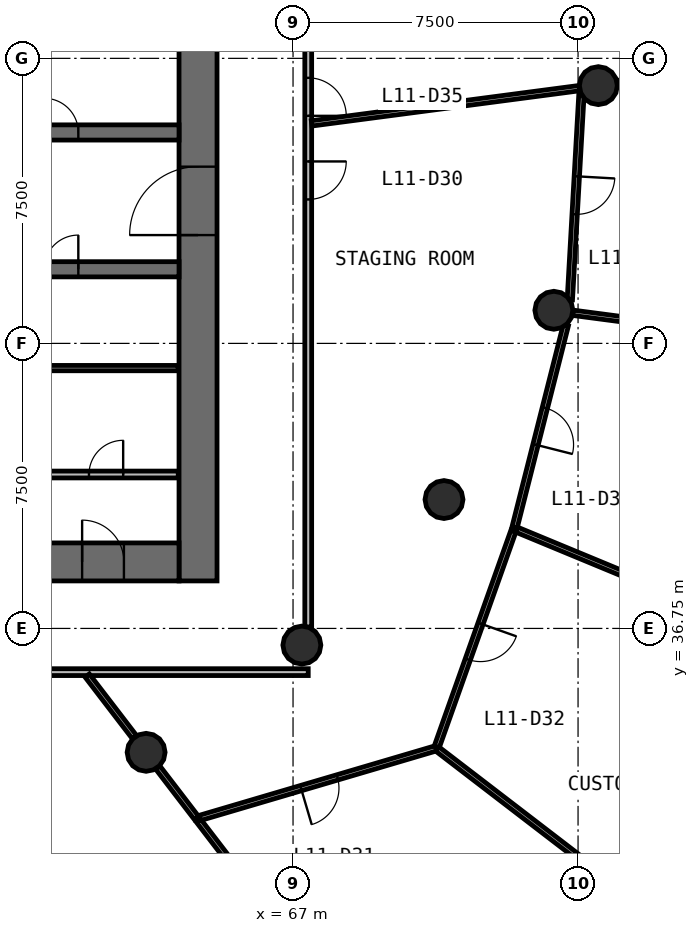
"""IFC4 building model, lengths in metres.
Left out: names, types, materials, properties, quantities, classifications, styles, units other than length and angle.
Written with IfcOpenShell. Run it as: python <this file> out.ifc"""

import sys

from ifc_helpers import new_model, si_unit, direction, frame, frame_2d, origin, origin_2d, place, context, subcontext, project, spatial, rectangle, circle, extrude, source, transform, mapped, element, fill, save


model = new_model("IFC4")
c1 = context("Model", 3, precision=1e-05, world=origin(), true_north=direction((0.0, 1.0)))
c2 = subcontext(c1, "Body", "Model", "MODEL_VIEW")
j1 = project(units=[si_unit("LENGTHUNIT", "METRE"), si_unit("PLANEANGLEUNIT", "RADIAN")], contexts=[c1])
p1 = place(None, origin())
s1 = spatial("IfcSite", under=j1, at=p1, CompositionType="ELEMENT")
p2 = place(p1, origin())
s2 = spatial("IfcBuilding", under=s1, at=p2, CompositionType="ELEMENT")
p3 = place(p2, frame((0.0, 0.0, 49.0)))
s3 = spatial("IfcBuildingStorey", under=s2, at=p3, CompositionType="ELEMENT", Elevation=49.0)
p4 = place(p3, frame((64.5, 38.0, 0.0), z_axis=(0.0, 0.0, 1.0), x_axis=(0.0, 1.0, 0.0)))
e1 = element("IfcWall", 1, at=p4, inside=s3, PredefinedType="SHEAR", context=c2, shape_type="SweptSolid", body=[
    extrude(rectangle(XDim=20.0, YDim=1.0, at=frame_2d((10.0, 0.0))), origin(), (0.0, 0.0, 1.0), 4.4),
])
p5 = place(p4, frame((9.1, 0.0, 0.0)))
e2 = element("IfcOpeningElement", 2, at=p5, cuts=e1, PredefinedType="OPENING", context=c2, shape_type="SweptSolid", body=[
    extrude(rectangle(XDim=1.8, YDim=2.1, at=frame_2d((0.9, 1.05))), frame((0.0, 0.51, 0.0), z_axis=(0.0, -1.0, 0.0), x_axis=(1.0, 0.0, 0.0)), (0.0, 0.0, 1.0), 1.02),
])
p6 = place(p3, frame((40.0, 38.5, 0.0), z_axis=(0.0, 0.0, 1.0), x_axis=(1.0, 0.0, 0.0)))
e3 = element("IfcWall", 3, at=p6, inside=s3, PredefinedType="SHEAR", context=c2, shape_type="SweptSolid", body=[
    extrude(rectangle(XDim=24.0, YDim=1.0, at=frame_2d((12.0, 0.0))), origin(), (0.0, 0.0, 1.0), 4.4),
])
p7 = place(p6, frame((21.45, 0.0, 0.0)))
e4 = element("IfcOpeningElement", 4, at=p7, cuts=e3, PredefinedType="OPENING", context=c2, shape_type="SweptSolid", body=[
    extrude(rectangle(XDim=1.1, YDim=2.1, at=frame_2d((0.55, 1.05))), frame((0.0, 0.51, 0.0), z_axis=(0.0, -1.0, 0.0), x_axis=(1.0, 0.0, 0.0)), (0.0, 0.0, 1.0), 1.02),
])
p8 = place(p6, frame((1.95, 0.0, 0.0)))
e5 = element("IfcOpeningElement", 5, at=p8, cuts=e3, PredefinedType="OPENING", context=c2, shape_type="SweptSolid", body=[
    extrude(rectangle(XDim=1.1, YDim=2.1, at=frame_2d((0.55, 1.05))), frame((0.0, 0.51, 0.0), z_axis=(0.0, -1.0, 0.0), x_axis=(1.0, 0.0, 0.0)), (0.0, 0.0, 1.0), 1.02),
])
p9 = place(p3, frame((40.0, 49.8, 0.0), z_axis=(0.0, 0.0, 1.0), x_axis=(1.0, 0.0, 0.0)))
e6 = element("IfcWall", 6, at=p9, inside=s3, PredefinedType="SHEAR", context=c2, shape_type="SweptSolid", body=[
    extrude(rectangle(XDim=24.0, YDim=0.4, at=frame_2d((12.0, 0.0))), origin(), (0.0, 0.0, 1.0), 4.4),
])
p10 = place(p9, frame((4.5, 0.0, 0.0)))
e7 = element("IfcOpeningElement", 7, at=p10, cuts=e6, PredefinedType="OPENING", context=c2, shape_type="SweptSolid", body=[
    extrude(rectangle(XDim=1.1, YDim=2.1, at=frame_2d((0.55, 1.05))), frame((0.0, 0.21, 0.0), z_axis=(0.0, -1.0, 0.0), x_axis=(1.0, 0.0, 0.0)), (0.0, 0.0, 1.0), 0.42),
])
p11 = place(p9, frame((7.0, 0.0, 0.0)))
e8 = element("IfcOpeningElement", 8, at=p11, cuts=e6, PredefinedType="OPENING", context=c2, shape_type="SweptSolid", body=[
    extrude(rectangle(XDim=1.1, YDim=2.1, at=frame_2d((0.55, 1.05))), frame((0.0, 0.21, 0.0), z_axis=(0.0, -1.0, 0.0), x_axis=(1.0, 0.0, 0.0)), (0.0, 0.0, 1.0), 0.42),
])
p12 = place(p9, frame((9.5, 0.0, 0.0)))
e9 = element("IfcOpeningElement", 9, at=p12, cuts=e6, PredefinedType="OPENING", context=c2, shape_type="SweptSolid", body=[
    extrude(rectangle(XDim=1.1, YDim=2.1, at=frame_2d((0.55, 1.05))), frame((0.0, 0.21, 0.0), z_axis=(0.0, -1.0, 0.0), x_axis=(1.0, 0.0, 0.0)), (0.0, 0.0, 1.0), 0.42),
])
p13 = place(p9, frame((0.9, 0.0, 0.0)))
e10 = element("IfcOpeningElement", 10, at=p13, cuts=e6, PredefinedType="OPENING", context=c2, shape_type="SweptSolid", body=[
    extrude(rectangle(XDim=1.8, YDim=2.4, at=frame_2d((0.9, 1.2))), frame((0.0, 0.21, 0.0), z_axis=(0.0, -1.0, 0.0), x_axis=(1.0, 0.0, 0.0)), (0.0, 0.0, 1.0), 0.42),
])
p14 = place(p9, frame((20.45, 0.0, 0.0)))
e11 = element("IfcOpeningElement", 11, at=p14, cuts=e6, PredefinedType="OPENING", context=c2, shape_type="SweptSolid", body=[
    extrude(rectangle(XDim=0.9, YDim=2.1, at=frame_2d((0.45, 1.05))), frame((0.0, 0.21, 0.0), z_axis=(0.0, -1.0, 0.0), x_axis=(1.0, 0.0, 0.0)), (0.0, 0.0, 1.0), 0.42),
])
p15 = place(p9, frame((11.65, 0.0, 0.0)))
e12 = element("IfcOpeningElement", 12, at=p15, cuts=e6, PredefinedType="OPENING", context=c2, shape_type="SweptSolid", body=[
    extrude(rectangle(XDim=0.9, YDim=2.1, at=frame_2d((0.45, 1.05))), frame((0.0, 0.21, 0.0), z_axis=(0.0, -1.0, 0.0), x_axis=(1.0, 0.0, 0.0)), (0.0, 0.0, 1.0), 0.42),
])
p16 = place(p3, frame((40.0, 46.2, 0.0), z_axis=(0.0, 0.0, 1.0), x_axis=(1.0, 0.0, 0.0)))
e13 = element("IfcWall", 13, at=p16, inside=s3, PredefinedType="SHEAR", context=c2, shape_type="SweptSolid", body=[
    extrude(rectangle(XDim=24.0, YDim=0.4, at=frame_2d((12.0, 0.0))), origin(), (0.0, 0.0, 1.0), 4.4),
])
p17 = place(p16, frame((4.5, 0.0, 0.0)))
e14 = element("IfcOpeningElement", 14, at=p17, cuts=e13, PredefinedType="OPENING", context=c2, shape_type="SweptSolid", body=[
    extrude(rectangle(XDim=1.1, YDim=2.1, at=frame_2d((0.55, 1.05))), frame((0.0, 0.21, 0.0), z_axis=(0.0, -1.0, 0.0), x_axis=(1.0, 0.0, 0.0)), (0.0, 0.0, 1.0), 0.42),
])
p18 = place(p16, frame((7.0, 0.0, 0.0)))
e15 = element("IfcOpeningElement", 15, at=p18, cuts=e13, PredefinedType="OPENING", context=c2, shape_type="SweptSolid", body=[
    extrude(rectangle(XDim=1.1, YDim=2.1, at=frame_2d((0.55, 1.05))), frame((0.0, 0.21, 0.0), z_axis=(0.0, -1.0, 0.0), x_axis=(1.0, 0.0, 0.0)), (0.0, 0.0, 1.0), 0.42),
])
p19 = place(p16, frame((9.5, 0.0, 0.0)))
e16 = element("IfcOpeningElement", 16, at=p19, cuts=e13, PredefinedType="OPENING", context=c2, shape_type="SweptSolid", body=[
    extrude(rectangle(XDim=1.1, YDim=2.1, at=frame_2d((0.55, 1.05))), frame((0.0, 0.21, 0.0), z_axis=(0.0, -1.0, 0.0), x_axis=(1.0, 0.0, 0.0)), (0.0, 0.0, 1.0), 0.42),
])
p20 = place(p16, frame((20.45, 0.0, 0.0)))
e17 = element("IfcOpeningElement", 17, at=p20, cuts=e13, PredefinedType="OPENING", context=c2, shape_type="SweptSolid", body=[
    extrude(rectangle(XDim=0.9, YDim=2.1, at=frame_2d((0.45, 1.05))), frame((0.0, 0.21, 0.0), z_axis=(0.0, -1.0, 0.0), x_axis=(1.0, 0.0, 0.0)), (0.0, 0.0, 1.0), 0.42),
])
p21 = place(p16, frame((2.65, 0.0, 0.0)))
e18 = element("IfcOpeningElement", 18, at=p21, cuts=e13, PredefinedType="OPENING", context=c2, shape_type="SweptSolid", body=[
    extrude(rectangle(XDim=0.9, YDim=2.1, at=frame_2d((0.45, 1.05))), frame((0.0, 0.21, 0.0), z_axis=(0.0, -1.0, 0.0), x_axis=(1.0, 0.0, 0.0)), (0.0, 0.0, 1.0), 0.42),
])
p22 = place(p16, frame((11.65, 0.0, 0.0)))
e19 = element("IfcOpeningElement", 19, at=p22, cuts=e13, PredefinedType="OPENING", context=c2, shape_type="SweptSolid", body=[
    extrude(rectangle(XDim=0.9, YDim=2.1, at=frame_2d((0.45, 1.05))), frame((0.0, 0.21, 0.0), z_axis=(0.0, -1.0, 0.0), x_axis=(1.0, 0.0, 0.0)), (0.0, 0.0, 1.0), 0.42),
])
m1 = source(origin(), c2, "Body", "SweptSolid", [
    extrude(circle(Radius=0.5, at=origin_2d()), origin(), (0.0, 0.0, 1.0), 4.4),
])
for number, where, z_axis, x_axis in (
    (20, (75.034, 51.032, 0.0), (0.0, 0.0, 1.0), (1.0, 0.0, 0.0)),
    (21, (63.134, 33.49, 0.0), (0.0, 0.0, 1.0), (1.0, 0.0, 0.0)),
    (22, (67.232, 36.312, 0.0), (0.0, 0.0, 1.0), (1.0, 0.0, 0.0)),
    (23, (70.972, 40.141, 0.0), (0.0, 0.0, 1.0), (1.0, 0.0, 0.0)),
    (24, (73.863, 45.122, 0.0), (0.0, 0.0, 1.0), (1.0, 0.0, 0.0)),
):
    element("IfcColumn", number, at=place(p3, frame(where, z_axis=z_axis, x_axis=x_axis)), inside=s3, PredefinedType="COLUMN", context=c2, shape_type="MappedRepresentation", body=[
        mapped(m1, transform((0.0, 0.0, 0.0), scale=1.0)),
    ])
p23 = place(p3, frame((67.4, 35.6, 0.0), z_axis=(0.0, 0.0, 1.0), x_axis=(-1.0, 0.0, 0.0)))
e25 = element("IfcWall", 25, at=p23, inside=s3, PredefinedType="PARTITIONING", context=c2, shape_type="SweptSolid", body=[
    extrude(rectangle(XDim=30.8, YDim=0.18, at=frame_2d((15.4, 0.0))), origin(), (0.0, 0.0, 1.0), 3.05),
])
p24 = place(p23, frame((27.45, 0.0, 0.0)))
e26 = element("IfcOpeningElement", 26, at=p24, cuts=e25, PredefinedType="OPENING", context=c2, shape_type="SweptSolid", body=[
    extrude(rectangle(XDim=0.9, YDim=2.1, at=frame_2d((0.45, 1.05))), frame((0.0, 0.1, 0.0), z_axis=(0.0, -1.0, 0.0), x_axis=(1.0, 0.0, 0.0)), (0.0, 0.0, 1.0), 0.2),
])
p25 = place(p23, frame((23.85, 0.0, 0.0)))
e27 = element("IfcOpeningElement", 27, at=p25, cuts=e25, PredefinedType="OPENING", context=c2, shape_type="SweptSolid", body=[
    extrude(rectangle(XDim=0.9, YDim=2.1, at=frame_2d((0.45, 1.05))), frame((0.0, 0.1, 0.0), z_axis=(0.0, -1.0, 0.0), x_axis=(1.0, 0.0, 0.0)), (0.0, 0.0, 1.0), 0.2),
])
p26 = place(p23, frame((20.85, 0.0, 0.0)))
e28 = element("IfcOpeningElement", 28, at=p26, cuts=e25, PredefinedType="OPENING", context=c2, shape_type="SweptSolid", body=[
    extrude(rectangle(XDim=0.9, YDim=2.1, at=frame_2d((0.45, 1.05))), frame((0.0, 0.1, 0.0), z_axis=(0.0, -1.0, 0.0), x_axis=(1.0, 0.0, 0.0)), (0.0, 0.0, 1.0), 0.2),
])
p27 = place(p23, frame((14.95, 0.0, 0.0)))
e29 = element("IfcOpeningElement", 29, at=p27, cuts=e25, PredefinedType="OPENING", context=c2, shape_type="SweptSolid", body=[
    extrude(rectangle(XDim=1.0, YDim=2.1, at=frame_2d((0.5, 1.05))), frame((0.0, 0.1, 0.0), z_axis=(0.0, -1.0, 0.0), x_axis=(1.0, 0.0, 0.0)), (0.0, 0.0, 1.0), 0.2),
])
p28 = place(p3, frame((67.4, 60.37, 0.0), z_axis=(0.0, 0.0, 1.0), x_axis=(0.0, -1.0, 0.0)))
e30 = element("IfcWall", 30, at=p28, inside=s3, PredefinedType="PARTITIONING", context=c2, shape_type="SweptSolid", body=[
    extrude(rectangle(XDim=23.583, YDim=0.18, at=frame_2d((11.791, 0.0))), origin(), (0.0, 0.0, 1.0), 3.05),
])
p29 = place(p28, frame((11.333, 0.0, 0.0)))
e31 = element("IfcOpeningElement", 31, at=p29, cuts=e30, PredefinedType="OPENING", context=c2, shape_type="SweptSolid", body=[
    extrude(rectangle(XDim=1.0, YDim=2.1, at=frame_2d((0.5, 1.05))), frame((0.0, 0.1, 0.0), z_axis=(0.0, -1.0, 0.0), x_axis=(1.0, 0.0, 0.0)), (0.0, 0.0, 1.0), 0.2),
])
p30 = place(p28, frame((9.133, 0.0, 0.0)))
e32 = element("IfcOpeningElement", 32, at=p30, cuts=e30, PredefinedType="OPENING", context=c2, shape_type="SweptSolid", body=[
    extrude(rectangle(XDim=1.0, YDim=2.1, at=frame_2d((0.5, 1.05))), frame((0.0, 0.1, 0.0), z_axis=(0.0, -1.0, 0.0), x_axis=(1.0, 0.0, 0.0)), (0.0, 0.0, 1.0), 0.2),
])
p31 = place(p3, frame((60.23, 40.8, 0.0), z_axis=(0.0, 0.0, 1.0), x_axis=(1.0, 0.0, 0.0)))
e33 = element("IfcWall", 33, at=p31, inside=s3, PredefinedType="PARTITIONING", context=c2, shape_type="SweptSolid", body=[
    extrude(rectangle(XDim=3.75, YDim=0.18, at=frame_2d((1.875, 0.0))), origin(), (0.0, 0.0, 1.0), 3.95),
])
p32 = place(p31, frame((1.4, 0.0, 0.0)))
e34 = element("IfcOpeningElement", 34, at=p32, cuts=e33, PredefinedType="OPENING", context=c2, shape_type="SweptSolid", body=[
    extrude(rectangle(XDim=0.9, YDim=2.1, at=frame_2d((0.45, 1.05))), frame((0.0, 0.1, 0.0), z_axis=(0.0, -1.0, 0.0), x_axis=(1.0, 0.0, 0.0)), (0.0, 0.0, 1.0), 0.2),
])
p33 = place(p3, frame((75.534, 51.098, 0.0), z_axis=(0.0, 0.0, 1.0), x_axis=(0.991446586451, 0.130513088287, 0.0)))
e35 = element("IfcWall", 35, at=p33, inside=s3, PredefinedType="PARTITIONING", context=c2, shape_type="SweptSolid", body=[
    extrude(rectangle(XDim=11.86, YDim=0.14, at=frame_2d((5.93, 0.0))), origin(), (0.0, 0.0, 1.0), 3.05),
])
p34 = place(p3, frame((74.363, 45.056, 0.0), z_axis=(0.0, 0.0, 1.0), x_axis=(0.991443306772, -0.130538000051, 0.0)))
e36 = element("IfcWall", 36, at=p34, inside=s3, PredefinedType="PARTITIONING", context=c2, shape_type="SweptSolid", body=[
    extrude(rectangle(XDim=11.195, YDim=0.14, at=frame_2d((5.598, 0.0))), origin(), (0.0, 0.0, 1.0), 3.05),
])
p35 = place(p3, frame((72.821, 39.375, 0.0), z_axis=(0.0, 0.0, 1.0), x_axis=(0.923875203153, -0.382693884193, 0.0)))
e37 = element("IfcWall", 37, at=p35, inside=s3, PredefinedType="PARTITIONING", context=c2, shape_type="SweptSolid", body=[
    extrude(rectangle(XDim=8.845, YDim=0.14, at=frame_2d((4.423, 0.0))), origin(), (0.0, 0.0, 1.0), 3.05),
])
p36 = place(p3, frame((67.49, 50.039, 0.0), z_axis=(0.0, 0.0, 1.0), x_axis=(0.99144622305, 0.130515848849, 0.0)))
e38 = element("IfcWall", 38, at=p36, inside=s3, PredefinedType="PARTITIONING", context=c2, shape_type="SweptSolid", body=[
    extrude(rectangle(XDim=7.104, YDim=0.14, at=frame_2d((3.552, 0.0))), origin(), (0.0, 0.0, 1.0), 3.05),
])
p37 = place(p3, frame((70.769, 33.598, 0.0), z_axis=(0.0, 0.0, 1.0), x_axis=(-0.959164410747, -0.282849134974, 0.0)))
e39 = element("IfcWall", 39, at=p37, inside=s3, PredefinedType="PARTITIONING", context=c2, shape_type="SweptSolid", body=[
    extrude(rectangle(XDim=6.562, YDim=0.14, at=frame_2d((3.281, 0.0))), origin(), (0.0, 0.0, 1.0), 3.05),
])
p38 = place(p37, frame((2.712, 0.0, 0.0)))
e40 = element("IfcOpeningElement", 40, at=p38, cuts=e39, PredefinedType="OPENING", context=c2, shape_type="SweptSolid", body=[
    extrude(rectangle(XDim=1.0, YDim=2.1, at=frame_2d((0.5, 1.05))), frame((0.0, 0.08, 0.0), z_axis=(0.0, -1.0, 0.0), x_axis=(1.0, 0.0, 0.0)), (0.0, 0.0, 1.0), 0.16),
])
p39 = place(p3, frame((72.798, 39.309, 0.0), z_axis=(0.0, 0.0, 1.0), x_axis=(-0.334820387554, -0.942281968456, 0.0)))
e41 = element("IfcWall", 41, at=p39, inside=s3, PredefinedType="PARTITIONING", context=c2, shape_type="SweptSolid", body=[
    extrude(rectangle(XDim=6.031, YDim=0.14, at=frame_2d((3.016, 0.0))), origin(), (0.0, 0.0, 1.0), 3.05),
])
p40 = place(p39, frame((2.581, 0.0, 0.0)))
e42 = element("IfcOpeningElement", 42, at=p40, cuts=e41, PredefinedType="OPENING", context=c2, shape_type="SweptSolid", body=[
    extrude(rectangle(XDim=1.0, YDim=2.1, at=frame_2d((0.5, 1.05))), frame((0.0, 0.08, 0.0), z_axis=(0.0, -1.0, 0.0), x_axis=(1.0, 0.0, 0.0)), (0.0, 0.0, 1.0), 0.16),
])
p41 = place(p3, frame((70.793, 33.58, 0.0), z_axis=(0.0, 0.0, 1.0), x_axis=(0.793369467151, -0.6087404115, 0.0)))
e43 = element("IfcWall", 43, at=p41, inside=s3, PredefinedType="PARTITIONING", context=c2, shape_type="SweptSolid", body=[
    extrude(rectangle(XDim=5.608, YDim=0.14, at=frame_2d((2.804, 0.0))), origin(), (0.0, 0.0, 1.0), 3.05),
])
p42 = place(p3, frame((74.178, 44.727, 0.0), z_axis=(0.0, 0.0, 1.0), x_axis=(-0.245735490717, -0.969336922129, 0.0)))
e44 = element("IfcWall", 44, at=p42, inside=s3, PredefinedType="PARTITIONING", context=c2, shape_type="SweptSolid", body=[
    extrude(rectangle(XDim=5.491, YDim=0.14, at=frame_2d((2.746, 0.0))), origin(), (0.0, 0.0, 1.0), 3.05),
])
p43 = place(p42, frame((2.241, 0.0, 0.0)))
e45 = element("IfcOpeningElement", 45, at=p43, cuts=e44, PredefinedType="OPENING", context=c2, shape_type="SweptSolid", body=[
    extrude(rectangle(XDim=1.0, YDim=2.1, at=frame_2d((0.5, 1.05))), frame((0.0, 0.08, 0.0), z_axis=(0.0, -1.0, 0.0), x_axis=(1.0, 0.0, 0.0)), (0.0, 0.0, 1.0), 0.16),
])
p44 = place(p3, frame((74.589, 50.793, 0.0), z_axis=(0.0, 0.0, 1.0), x_axis=(-0.056551571082, -0.998399679391, 0.0)))
e46 = element("IfcWall", 46, at=p44, inside=s3, PredefinedType="PARTITIONING", context=c2, shape_type="SweptSolid", body=[
    extrude(rectangle(XDim=5.401, YDim=0.14, at=frame_2d((2.7, 0.0))), origin(), (0.0, 0.0, 1.0), 3.05),
])
p45 = place(p44, frame((2.151, 0.0, 0.0)))
e47 = element("IfcOpeningElement", 47, at=p45, cuts=e46, PredefinedType="OPENING", context=c2, shape_type="SweptSolid", body=[
    extrude(rectangle(XDim=1.0, YDim=2.1, at=frame_2d((0.5, 1.05))), frame((0.0, 0.08, 0.0), z_axis=(0.0, -1.0, 0.0), x_axis=(1.0, 0.0, 0.0)), (0.0, 0.0, 1.0), 0.16),
])
p46 = place(p3, frame((60.23, 43.6, 0.0), z_axis=(0.0, 0.0, 1.0), x_axis=(1.0, 0.0, 0.0)))
e48 = element("IfcWall", 48, at=p46, inside=s3, PredefinedType="PARTITIONING", context=c2, shape_type="SweptSolid", body=[
    extrude(rectangle(XDim=3.75, YDim=0.14, at=frame_2d((1.875, 0.0))), origin(), (0.0, 0.0, 1.0), 3.05),
])
p47 = place(p3, frame((64.521, 31.683, 0.0), z_axis=(0.0, 0.0, 1.0), x_axis=(0.608761578312, -0.793353225727, 0.0)))
e49 = element("IfcWall", 49, at=p47, inside=s3, PredefinedType="PARTITIONING", context=c2, shape_type="SweptSolid", body=[
    extrude(rectangle(XDim=2.748, YDim=0.14, at=frame_2d((1.374, 0.0))), origin(), (0.0, 0.0, 1.0), 3.05),
])
p48 = place(p3, frame((61.584, 35.51, 0.0), z_axis=(0.0, 0.0, 1.0), x_axis=(0.608727763541, -0.793379171578, 0.0)))
e50 = element("IfcWall", 50, at=p48, inside=s3, PredefinedType="PARTITIONING", context=c2, shape_type="SweptSolid", body=[
    extrude(rectangle(XDim=2.042, YDim=0.14, at=frame_2d((1.021, 0.0))), origin(), (0.0, 0.0, 1.0), 3.05),
])
p49 = place(p3, frame((63.441, 33.09, 0.0), z_axis=(0.0, 0.0, 1.0), x_axis=(0.608812360851, -0.793314256317, 0.0)))
e51 = element("IfcWall", 51, at=p49, inside=s3, PredefinedType="PARTITIONING", context=c2, shape_type="SweptSolid", body=[
    extrude(rectangle(XDim=1.669, YDim=0.14, at=frame_2d((0.834, 0.0))), origin(), (0.0, 0.0, 1.0), 3.05),
])
m2 = source(origin(), c2, "Body", "SweptSolid", [
    extrude(rectangle(XDim=1.8, YDim=2.1, at=frame_2d((0.9, 1.05))), frame((0.0, 0.025, 0.0), z_axis=(0.0, -1.0, 0.0), x_axis=(1.0, 0.0, 0.0)), (0.0, 0.0, 1.0), 0.05),
])
p50 = place(p5, origin())
e52 = element("IfcDoor", 52, at=p50, inside=s3, OperationType="SINGLE_SWING_LEFT", PredefinedType="DOOR", context=c2, shape_type="MappedRepresentation", body=[
    mapped(m2, transform((0.0, 0.0, 0.0), scale=1.0)),
])
fill(e2, e52)
m3 = source(origin(), c2, "Body", "SweptSolid", [
    extrude(rectangle(XDim=1.1, YDim=2.1, at=frame_2d((0.55, 1.05))), frame((0.0, 0.025, 0.0), z_axis=(0.0, -1.0, 0.0), x_axis=(1.0, 0.0, 0.0)), (0.0, 0.0, 1.0), 0.05),
])
p51 = place(p7, origin())
e53 = element("IfcDoor", 53, at=p51, inside=s3, OperationType="SINGLE_SWING_LEFT", PredefinedType="DOOR", context=c2, shape_type="MappedRepresentation", body=[
    mapped(m3, transform((0.0, 0.0, 0.0), scale=1.0)),
])
fill(e4, e53)
m4 = source(origin(), c2, "Body", "SweptSolid", [
    extrude(rectangle(XDim=1.0, YDim=2.1, at=frame_2d((0.5, 1.05))), frame((0.0, 0.025, 0.0), z_axis=(0.0, -1.0, 0.0), x_axis=(1.0, 0.0, 0.0)), (0.0, 0.0, 1.0), 0.05),
])
p52 = place(p29, origin())
e54 = element("IfcDoor", 54, at=p52, inside=s3, OperationType="SINGLE_SWING_LEFT", PredefinedType="DOOR", context=c2, shape_type="MappedRepresentation", body=[
    mapped(m4, transform((0.0, 0.0, 0.0), scale=1.0)),
])
fill(e31, e54)
p53 = place(p38, origin())
e55 = element("IfcDoor", 55, at=p53, inside=s3, OperationType="SINGLE_SWING_RIGHT", PredefinedType="DOOR", context=c2, shape_type="MappedRepresentation", body=[
    mapped(m4, transform((0.0, 0.0, 0.0), scale=1.0)),
])
fill(e40, e55)
p54 = place(p40, origin())
e56 = element("IfcDoor", 56, at=p54, inside=s3, OperationType="SINGLE_SWING_LEFT", PredefinedType="DOOR", context=c2, shape_type="MappedRepresentation", body=[
    mapped(m4, transform((0.0, 0.0, 0.0), scale=1.0)),
])
fill(e42, e56)
p55 = place(p43, origin())
e57 = element("IfcDoor", 57, at=p55, inside=s3, OperationType="SINGLE_SWING_RIGHT", PredefinedType="DOOR", context=c2, shape_type="MappedRepresentation", body=[
    mapped(m4, transform((0.0, 0.0, 0.0), scale=1.0)),
])
fill(e45, e57)
p56 = place(p45, origin())
e58 = element("IfcDoor", 58, at=p56, inside=s3, OperationType="SINGLE_SWING_LEFT", PredefinedType="DOOR", context=c2, shape_type="MappedRepresentation", body=[
    mapped(m4, transform((0.0, 0.0, 0.0), scale=1.0)),
])
fill(e47, e58)
p57 = place(p30, origin())
e59 = element("IfcDoor", 59, at=p57, inside=s3, OperationType="SINGLE_SWING_RIGHT", PredefinedType="DOOR", context=c2, shape_type="MappedRepresentation", body=[
    mapped(m4, transform((0.0, 0.0, 0.0), scale=1.0)),
])
fill(e32, e59)
m5 = source(origin(), c2, "Body", "SweptSolid", [
    extrude(rectangle(XDim=0.9, YDim=2.1, at=frame_2d((0.45, 1.05))), frame((0.0, 0.025, 0.0), z_axis=(0.0, -1.0, 0.0), x_axis=(1.0, 0.0, 0.0)), (0.0, 0.0, 1.0), 0.05),
])
p58 = place(p20, origin())
e60 = element("IfcDoor", 60, at=p58, inside=s3, OperationType="SINGLE_SWING_RIGHT", PredefinedType="DOOR", context=c2, shape_type="MappedRepresentation", body=[
    mapped(m5, transform((0.0, 0.0, 0.0), scale=1.0)),
])
fill(e17, e60)
p59 = place(p14, origin())
e61 = element("IfcDoor", 61, at=p59, inside=s3, OperationType="SINGLE_SWING_LEFT", PredefinedType="DOOR", context=c2, shape_type="MappedRepresentation", body=[
    mapped(m5, transform((0.0, 0.0, 0.0), scale=1.0)),
])
fill(e11, e61)
p60 = place(p32, origin())
e62 = element("IfcDoor", 62, at=p60, inside=s3, OperationType="SINGLE_SWING_RIGHT", PredefinedType="DOOR", context=c2, shape_type="MappedRepresentation", body=[
    mapped(m5, transform((0.0, 0.0, 0.0), scale=1.0)),
])
fill(e34, e62)
save(model, sys.argv[1])
